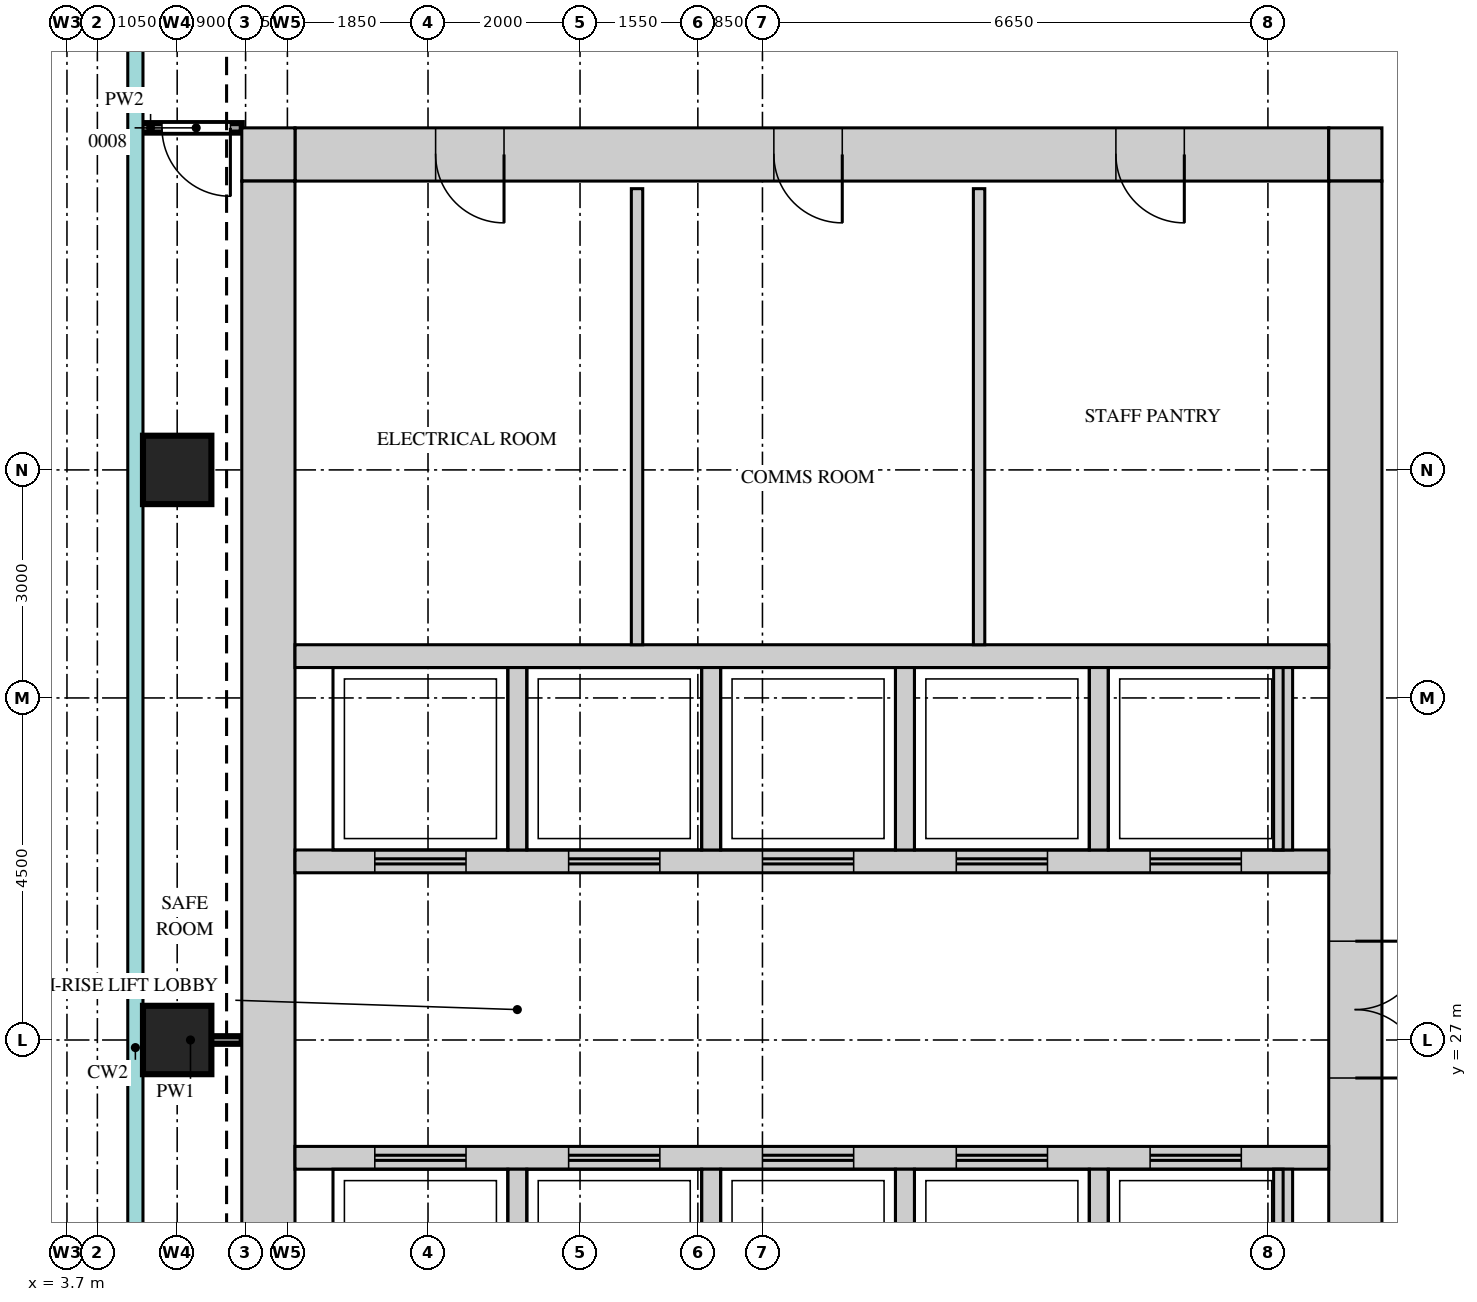
"""IFC4 building model, lengths in metres.
Left out: names, types, materials, properties, quantities, classifications, styles, units other than length and angle.
Written with IfcOpenShell. Run it as: python <this file> out.ifc"""

import sys

from ifc_helpers import new_model, si_unit, direction, frame, frame_2d, origin, origin_2d, place, context, subcontext, project, spatial, rectangle, extrude, source, transform, mapped, element, fill, save


model = new_model("IFC4")
c1 = context("Model", 3, precision=1e-05, world=origin(), true_north=direction((0.0, 1.0)))
c2 = subcontext(c1, "Body", "Model", "MODEL_VIEW")
j1 = project(units=[si_unit("LENGTHUNIT", "METRE"), si_unit("PLANEANGLEUNIT", "RADIAN")], contexts=[c1])
p1 = place(None, origin())
s1 = spatial("IfcSite", under=j1, at=p1, CompositionType="ELEMENT")
p2 = place(p1, origin())
s2 = spatial("IfcBuilding", under=s1, at=p2, CompositionType="ELEMENT")
p3 = place(p2, frame((0.0, 0.0, 242.2)))
s3 = spatial("IfcBuildingStorey", under=s2, at=p3, CompositionType="ELEMENT", Elevation=242.2)
m1 = source(origin(), c2, "Body", "SweptSolid", [
    extrude(rectangle(XDim=13.6, YDim=0.7, at=frame_2d((6.8, 0.0))), origin(), (0.0, 0.0, 1.0), 3.75),
])
p4 = place(p3, frame((6.7, 38.65, 0.0), z_axis=(0.0, 0.0, 1.0), x_axis=(1.0, 0.0, 0.0)))
e1 = element("IfcWall", 1, at=p4, inside=s3, PredefinedType="SHEAR", context=c2, shape_type="MappedRepresentation", body=[
    mapped(m1, transform((0.0, 0.0, 0.0))),
])
m2 = source(origin(), c2, "Body", "SweptSolid", [
    extrude(rectangle(XDim=0.9, YDim=2.1, at=frame_2d((0.45, 1.05))), frame((0.0, 0.36, 0.0), z_axis=(0.0, -1.0, 0.0), x_axis=(1.0, 0.0, 0.0)), (0.0, 0.0, 1.0), 0.72),
])
p5 = place(p4, frame((1.85, 0.0, 0.0)))
e2 = element("IfcOpeningElement", 2, at=p5, cuts=e1, PredefinedType="OPENING", context=c2, shape_type="MappedRepresentation", body=[
    mapped(m2, transform((0.0, 0.0, 0.0))),
])
p6 = place(p4, frame((6.3, 0.0, 0.0)))
e3 = element("IfcOpeningElement", 3, at=p6, cuts=e1, PredefinedType="OPENING", context=c2, shape_type="MappedRepresentation", body=[
    mapped(m2, transform((0.0, 0.0, 0.0))),
])
p7 = place(p4, frame((10.8, 0.0, 0.0)))
e4 = element("IfcOpeningElement", 4, at=p7, cuts=e1, PredefinedType="OPENING", context=c2, shape_type="MappedRepresentation", body=[
    mapped(m2, transform((0.0, 0.0, 0.0))),
])
m3 = source(origin(), c2, "Body", "SweptSolid", [
    extrude(rectangle(XDim=0.7, YDim=0.7, at=frame_2d((0.35, 0.0))), origin(), (0.0, 0.0, 1.0), 3.75),
])
for number, where, z_axis, x_axis in (
    (5, (20.3, 38.65, 0.0), (0.0, 0.0, 1.0), (1.0, 0.0, 0.0)),
    (6, (6.0, 38.65, 0.0), (0.0, 0.0, 1.0), (1.0, 0.0, 0.0)),
):
    element("IfcWall", number, at=place(p3, frame(where, z_axis=z_axis, x_axis=x_axis)), inside=s3, PredefinedType="SHEAR", context=c2, shape_type="MappedRepresentation", body=[
        mapped(m3, transform((0.0, 0.0, 0.0))),
    ])
m4 = source(origin(), c2, "Body", "SweptSolid", [
    extrude(rectangle(XDim=22.6, YDim=0.7, at=frame_2d((11.3, 0.0))), origin(), (0.0, 0.0, 1.0), 3.75),
])
p8 = place(p3, frame((20.65, 15.7, 0.0), z_axis=(0.0, 0.0, 1.0), x_axis=(0.0, 1.0, 0.0)))
e7 = element("IfcWall", 7, at=p8, inside=s3, PredefinedType="SHEAR", context=c2, shape_type="MappedRepresentation", body=[
    mapped(m4, transform((0.0, 0.0, 0.0))),
])
m5 = source(origin(), c2, "Body", "SweptSolid", [
    extrude(rectangle(XDim=1.8, YDim=2.1, at=frame_2d((0.9, 1.05))), frame((0.0, 0.36, 0.0), z_axis=(0.0, -1.0, 0.0), x_axis=(1.0, 0.0, 0.0)), (0.0, 0.0, 1.0), 0.72),
])
p9 = place(p8, frame((10.8, 0.0, 0.0)))
e8 = element("IfcOpeningElement", 8, at=p9, cuts=e7, PredefinedType="OPENING", context=c2, shape_type="MappedRepresentation", body=[
    mapped(m5, transform((0.0, 0.0, 0.0))),
])
p10 = place(p8, frame((0.45, 0.0, 0.0)))
e9 = element("IfcOpeningElement", 9, at=p10, cuts=e7, PredefinedType="OPENING", context=c2, shape_type="MappedRepresentation", body=[
    mapped(m2, transform((0.0, 0.0, 0.0))),
])
m6 = source(origin(), c2, "Body", "SweptSolid", [
    extrude(rectangle(XDim=1.0, YDim=2.1, at=frame_2d((0.5, 1.05))), frame((0.0, 0.36, 0.0), z_axis=(0.0, -1.0, 0.0), x_axis=(1.0, 0.0, 0.0)), (0.0, 0.0, 1.0), 0.72),
])
p11 = place(p8, frame((2.2, 0.0, 0.0)))
e10 = element("IfcOpeningElement", 10, at=p11, cuts=e7, PredefinedType="OPENING", context=c2, shape_type="MappedRepresentation", body=[
    mapped(m6, transform((0.0, 0.0, 0.0))),
])
p12 = place(p8, frame((5.0, 0.0, 0.0)))
e11 = element("IfcOpeningElement", 11, at=p12, cuts=e7, PredefinedType="OPENING", context=c2, shape_type="MappedRepresentation", body=[
    mapped(m2, transform((0.0, 0.0, 0.0))),
])
p13 = place(p3, frame((6.35, 15.7, 0.0), z_axis=(0.0, 0.0, 1.0), x_axis=(0.0, 1.0, 0.0)))
e12 = element("IfcWall", 12, at=p13, inside=s3, PredefinedType="SHEAR", context=c2, shape_type="MappedRepresentation", body=[
    mapped(m4, transform((0.0, 0.0, 0.0))),
])
m7 = source(origin(), c2, "Body", "SweptSolid", [
    extrude(rectangle(XDim=13.6, YDim=0.3, at=frame_2d((6.8, 0.0))), origin(), (0.0, 0.0, 1.0), 3.75),
])
p14 = place(p3, frame((6.7, 32.05, 0.0), z_axis=(0.0, 0.0, 1.0), x_axis=(1.0, 0.0, 0.0)))
e13 = element("IfcWall", 13, at=p14, inside=s3, PredefinedType="STANDARD", context=c2, shape_type="MappedRepresentation", body=[
    mapped(m7, transform((0.0, 0.0, 0.0))),
])
p15 = place(p3, frame((6.7, 29.35, 0.0), z_axis=(0.0, 0.0, 1.0), x_axis=(1.0, 0.0, 0.0)))
e14 = element("IfcWall", 14, at=p15, inside=s3, PredefinedType="STANDARD", context=c2, shape_type="MappedRepresentation", body=[
    mapped(m7, transform((0.0, 0.0, 0.0))),
])
m8 = source(origin(), c2, "Body", "SweptSolid", [
    extrude(rectangle(XDim=1.2, YDim=2.1, at=frame_2d((0.6, 1.05))), frame((0.0, 0.16, 0.0), z_axis=(0.0, -1.0, 0.0), x_axis=(1.0, 0.0, 0.0)), (0.0, 0.0, 1.0), 0.32),
])
p16 = place(p15, frame((1.05, 0.0, 0.0)))
e15 = element("IfcOpeningElement", 15, at=p16, cuts=e14, PredefinedType="OPENING", context=c2, shape_type="MappedRepresentation", body=[
    mapped(m8, transform((0.0, 0.0, 0.0))),
])
p17 = place(p15, frame((3.6, 0.0, 0.0)))
e16 = element("IfcOpeningElement", 16, at=p17, cuts=e14, PredefinedType="OPENING", context=c2, shape_type="MappedRepresentation", body=[
    mapped(m8, transform((0.0, 0.0, 0.0))),
])
p18 = place(p15, frame((6.15, 0.0, 0.0)))
e17 = element("IfcOpeningElement", 17, at=p18, cuts=e14, PredefinedType="OPENING", context=c2, shape_type="MappedRepresentation", body=[
    mapped(m8, transform((0.0, 0.0, 0.0))),
])
p19 = place(p15, frame((8.7, 0.0, 0.0)))
e18 = element("IfcOpeningElement", 18, at=p19, cuts=e14, PredefinedType="OPENING", context=c2, shape_type="MappedRepresentation", body=[
    mapped(m8, transform((0.0, 0.0, 0.0))),
])
p20 = place(p15, frame((11.25, 0.0, 0.0)))
e19 = element("IfcOpeningElement", 19, at=p20, cuts=e14, PredefinedType="OPENING", context=c2, shape_type="MappedRepresentation", body=[
    mapped(m8, transform((0.0, 0.0, 0.0))),
])
p21 = place(p3, frame((6.7, 25.45, 0.0), z_axis=(0.0, 0.0, 1.0), x_axis=(1.0, 0.0, 0.0)))
e20 = element("IfcWall", 20, at=p21, inside=s3, PredefinedType="STANDARD", context=c2, shape_type="MappedRepresentation", body=[
    mapped(m7, transform((0.0, 0.0, 0.0))),
])
p22 = place(p21, frame((1.05, 0.0, 0.0)))
e21 = element("IfcOpeningElement", 21, at=p22, cuts=e20, PredefinedType="OPENING", context=c2, shape_type="MappedRepresentation", body=[
    mapped(m8, transform((0.0, 0.0, 0.0))),
])
p23 = place(p21, frame((3.6, 0.0, 0.0)))
e22 = element("IfcOpeningElement", 22, at=p23, cuts=e20, PredefinedType="OPENING", context=c2, shape_type="MappedRepresentation", body=[
    mapped(m8, transform((0.0, 0.0, 0.0))),
])
p24 = place(p21, frame((6.15, 0.0, 0.0)))
e23 = element("IfcOpeningElement", 23, at=p24, cuts=e20, PredefinedType="OPENING", context=c2, shape_type="MappedRepresentation", body=[
    mapped(m8, transform((0.0, 0.0, 0.0))),
])
p25 = place(p21, frame((8.7, 0.0, 0.0)))
e24 = element("IfcOpeningElement", 24, at=p25, cuts=e20, PredefinedType="OPENING", context=c2, shape_type="MappedRepresentation", body=[
    mapped(m8, transform((0.0, 0.0, 0.0))),
])
p26 = place(p21, frame((11.25, 0.0, 0.0)))
e25 = element("IfcOpeningElement", 25, at=p26, cuts=e20, PredefinedType="OPENING", context=c2, shape_type="MappedRepresentation", body=[
    mapped(m8, transform((0.0, 0.0, 0.0))),
])
m9 = source(origin(), c2, "Body", "SweptSolid", [
    extrude(rectangle(XDim=2.4, YDim=0.25, at=frame_2d((1.2, 0.0))), origin(), (0.0, 0.0, 1.0), 3.75),
])
for number, where, z_axis, x_axis in (
    (26, (17.275, 29.5, 0.0), (0.0, 0.0, 1.0), (0.0, 1.0, 0.0)),
    (27, (19.7, 29.5, 0.0), (0.0, 0.0, 1.0), (0.0, 1.0, 0.0)),
    (28, (9.625, 29.5, 0.0), (0.0, 0.0, 1.0), (0.0, 1.0, 0.0)),
    (29, (12.175, 29.5, 0.0), (0.0, 0.0, 1.0), (0.0, 1.0, 0.0)),
    (30, (14.725, 29.5, 0.0), (0.0, 0.0, 1.0), (0.0, 1.0, 0.0)),
):
    element("IfcWall", number, at=place(p3, frame(where, z_axis=z_axis, x_axis=x_axis)), inside=s3, PredefinedType="STANDARD", context=c2, shape_type="MappedRepresentation", body=[
        mapped(m9, transform((0.0, 0.0, 0.0))),
    ])
m10 = source(origin(), c2, "Body", "SweptSolid", [
    extrude(rectangle(XDim=2.4, YDim=0.25, at=frame_2d((1.2, 0.0))), origin(), (0.0, 0.0, 1.0), 3.75),
])
for number, where, z_axis, x_axis in (
    (31, (17.275, 22.9, 0.0), (0.0, 0.0, 1.0), (0.0, 1.0, 0.0)),
    (32, (19.7, 22.9, 0.0), (0.0, 0.0, 1.0), (0.0, 1.0, 0.0)),
    (33, (9.625, 22.9, 0.0), (0.0, 0.0, 1.0), (0.0, 1.0, 0.0)),
    (34, (12.175, 22.9, 0.0), (0.0, 0.0, 1.0), (0.0, 1.0, 0.0)),
    (35, (14.725, 22.9, 0.0), (0.0, 0.0, 1.0), (0.0, 1.0, 0.0)),
):
    element("IfcWall", number, at=place(p3, frame(where, z_axis=z_axis, x_axis=x_axis)), inside=s3, PredefinedType="STANDARD", context=c2, shape_type="MappedRepresentation", body=[
        mapped(m10, transform((0.0, 0.0, 0.0))),
    ])
m11 = source(origin(), c2, "Body", "SweptSolid", [
    extrude(rectangle(XDim=0.9, YDim=0.9, at=origin_2d()), origin(), (0.0, 0.0, 1.0), 3.75),
])
for number, where, z_axis, x_axis in (
    (36, (5.15, 27.0, 0.0), (0.0, 0.0, 1.0), (1.0, 0.0, 0.0)),
    (37, (5.15, 34.5, 0.0), (0.0, 0.0, 1.0), (1.0, 0.0, 0.0)),
):
    element("IfcColumn", number, at=place(p3, frame(where, z_axis=z_axis, x_axis=x_axis)), inside=s3, PredefinedType="COLUMN", context=c2, shape_type="MappedRepresentation", body=[
        mapped(m11, transform((0.0, 0.0, 0.0))),
    ])
m12 = source(origin(), c2, "Body", "SweptSolid", [
    extrude(rectangle(XDim=1.35, YDim=0.1, at=frame_2d((0.675, 0.0))), origin(), (0.0, 0.0, 1.0), 3.8),
])
p27 = place(p3, frame((4.65, 27.0, 0.0), z_axis=(0.0, 0.0, 1.0), x_axis=(1.0, 0.0, 0.0)))
e38 = element("IfcWall", 38, at=p27, inside=s3, PredefinedType="PARTITIONING", context=c2, shape_type="MappedRepresentation", body=[
    mapped(m12, transform((0.0, 0.0, 0.0))),
])
m13 = source(origin(), c2, "Body", "SweptSolid", [
    extrude(rectangle(XDim=6.0, YDim=0.15, at=frame_2d((3.0, 0.0))), origin(), (0.0, 0.0, 1.0), 3.8),
])
for number, where, z_axis, x_axis in (
    (39, (11.2, 32.2, 0.0), (0.0, 0.0, 1.0), (0.0, 1.0, 0.0)),
    (40, (15.7, 32.2, 0.0), (0.0, 0.0, 1.0), (0.0, 1.0, 0.0)),
):
    element("IfcWall", number, at=place(p3, frame(where, z_axis=z_axis, x_axis=x_axis)), inside=s3, PredefinedType="PARTITIONING", context=c2, shape_type="MappedRepresentation", body=[
        mapped(m13, transform((0.0, 0.0, 0.0))),
    ])
m14 = source(origin(), c2, "Body", "SweptSolid", [
    extrude(rectangle(XDim=1.35, YDim=0.125, at=frame_2d((0.675, 0.0))), origin(), (0.0, 0.0, 1.0), 3.8),
])
p28 = place(p3, frame((4.65, 39.0, 0.0), z_axis=(0.0, 0.0, 1.0), x_axis=(1.0, 0.0, 0.0)))
e41 = element("IfcWall", 41, at=p28, inside=s3, PredefinedType="PARTITIONING", context=c2, shape_type="MappedRepresentation", body=[
    mapped(m14, transform((0.0, 0.0, 0.0))),
])
m15 = source(origin(), c2, "Body", "SweptSolid", [
    extrude(rectangle(XDim=0.9, YDim=2.1, at=frame_2d((0.45, 1.05))), frame((0.0, 0.073, 0.0), z_axis=(0.0, -1.0, 0.0), x_axis=(1.0, 0.0, 0.0)), (0.0, 0.0, 1.0), 0.145),
])
p29 = place(p28, frame((0.3, 0.0, 0.0)))
e42 = element("IfcOpeningElement", 42, at=p29, cuts=e41, PredefinedType="OPENING", context=c2, shape_type="MappedRepresentation", body=[
    mapped(m15, transform((0.0, 0.0, 0.0))),
])
m16 = source(origin(), c2, "Body", "SweptSolid", [
    extrude(rectangle(XDim=1.8, YDim=2.1, at=frame_2d((0.9, 1.05))), frame((0.0, 0.3, 0.0), z_axis=(0.0, -1.0, 0.0), x_axis=(1.0, 0.0, 0.0)), (0.0, 0.0, 1.0), 0.6),
])
p30 = place(p9, origin())
e43 = element("IfcDoor", 43, at=p30, inside=s3, OperationType="DOUBLE_DOOR_SINGLE_SWING", PredefinedType="DOOR", context=c2, shape_type="MappedRepresentation", body=[
    mapped(m16, transform((0.0, 0.0, 0.0))),
])
fill(e8, e43)
m17 = source(origin(), c2, "Body", "SweptSolid", [
    extrude(rectangle(XDim=0.9, YDim=2.1, at=frame_2d((0.45, 1.05))), frame((0.0, 0.3, 0.0), z_axis=(0.0, -1.0, 0.0), x_axis=(1.0, 0.0, 0.0)), (0.0, 0.0, 1.0), 0.6),
])
p31 = place(p5, origin())
e44 = element("IfcDoor", 44, at=p31, inside=s3, OperationType="SINGLE_SWING_RIGHT", PredefinedType="DOOR", context=c2, shape_type="MappedRepresentation", body=[
    mapped(m17, transform((0.0, 0.0, 0.0))),
])
fill(e2, e44)
p32 = place(p6, origin())
e45 = element("IfcDoor", 45, at=p32, inside=s3, OperationType="SINGLE_SWING_RIGHT", PredefinedType="DOOR", context=c2, shape_type="MappedRepresentation", body=[
    mapped(m17, transform((0.0, 0.0, 0.0))),
])
fill(e3, e45)
p33 = place(p7, origin())
e46 = element("IfcDoor", 46, at=p33, inside=s3, OperationType="SINGLE_SWING_RIGHT", PredefinedType="DOOR", context=c2, shape_type="MappedRepresentation", body=[
    mapped(m17, transform((0.0, 0.0, 0.0))),
])
fill(e4, e46)
m18 = source(origin(), c2, "Body", "SweptSolid", [
    extrude(rectangle(XDim=0.9, YDim=2.1, at=frame_2d((0.45, 1.05))), frame((0.0, 0.025, 0.0), z_axis=(0.0, -1.0, 0.0), x_axis=(1.0, 0.0, 0.0)), (0.0, 0.0, 1.0), 0.05),
])
p34 = place(p29, origin())
e47 = element("IfcDoor", 47, at=p34, inside=s3, OperationType="SINGLE_SWING_RIGHT", PredefinedType="DOOR", context=c2, shape_type="MappedRepresentation", body=[
    mapped(m18, transform((0.0, 0.0, 0.0))),
])
fill(e42, e47)
m19 = source(origin(), c2, "Body", "SweptSolid", [
    extrude(rectangle(XDim=1.2, YDim=2.1, at=frame_2d((0.6, 1.05))), frame((0.0, 0.025, 0.0), z_axis=(0.0, -1.0, 0.0), x_axis=(1.0, 0.0, 0.0)), (0.0, 0.0, 1.0), 0.05),
])
p35 = place(p22, origin())
e48 = element("IfcDoor", 48, at=p35, inside=s3, OperationType="DOUBLE_DOOR_SLIDING", PredefinedType="DOOR", context=c2, shape_type="MappedRepresentation", body=[
    mapped(m19, transform((0.0, 0.0, 0.0))),
])
fill(e21, e48)
p36 = place(p23, origin())
e49 = element("IfcDoor", 49, at=p36, inside=s3, OperationType="DOUBLE_DOOR_SLIDING", PredefinedType="DOOR", context=c2, shape_type="MappedRepresentation", body=[
    mapped(m19, transform((0.0, 0.0, 0.0))),
])
fill(e22, e49)
p37 = place(p24, origin())
e50 = element("IfcDoor", 50, at=p37, inside=s3, OperationType="DOUBLE_DOOR_SLIDING", PredefinedType="DOOR", context=c2, shape_type="MappedRepresentation", body=[
    mapped(m19, transform((0.0, 0.0, 0.0))),
])
fill(e23, e50)
p38 = place(p25, origin())
e51 = element("IfcDoor", 51, at=p38, inside=s3, OperationType="DOUBLE_DOOR_SLIDING", PredefinedType="DOOR", context=c2, shape_type="MappedRepresentation", body=[
    mapped(m19, transform((0.0, 0.0, 0.0))),
])
fill(e24, e51)
p39 = place(p26, origin())
e52 = element("IfcDoor", 52, at=p39, inside=s3, OperationType="DOUBLE_DOOR_SLIDING", PredefinedType="DOOR", context=c2, shape_type="MappedRepresentation", body=[
    mapped(m19, transform((0.0, 0.0, 0.0))),
])
fill(e25, e52)
p40 = place(p16, origin())
e53 = element("IfcDoor", 53, at=p40, inside=s3, OperationType="DOUBLE_DOOR_SLIDING", PredefinedType="DOOR", context=c2, shape_type="MappedRepresentation", body=[
    mapped(m19, transform((0.0, 0.0, 0.0))),
])
fill(e15, e53)
p41 = place(p17, origin())
e54 = element("IfcDoor", 54, at=p41, inside=s3, OperationType="DOUBLE_DOOR_SLIDING", PredefinedType="DOOR", context=c2, shape_type="MappedRepresentation", body=[
    mapped(m19, transform((0.0, 0.0, 0.0))),
])
fill(e16, e54)
p42 = place(p18, origin())
e55 = element("IfcDoor", 55, at=p42, inside=s3, OperationType="DOUBLE_DOOR_SLIDING", PredefinedType="DOOR", context=c2, shape_type="MappedRepresentation", body=[
    mapped(m19, transform((0.0, 0.0, 0.0))),
])
fill(e17, e55)
p43 = place(p19, origin())
e56 = element("IfcDoor", 56, at=p43, inside=s3, OperationType="DOUBLE_DOOR_SLIDING", PredefinedType="DOOR", context=c2, shape_type="MappedRepresentation", body=[
    mapped(m19, transform((0.0, 0.0, 0.0))),
])
fill(e18, e56)
p44 = place(p20, origin())
e57 = element("IfcDoor", 57, at=p44, inside=s3, OperationType="DOUBLE_DOOR_SLIDING", PredefinedType="DOOR", context=c2, shape_type="MappedRepresentation", body=[
    mapped(m19, transform((0.0, 0.0, 0.0))),
])
fill(e19, e57)
save(model, sys.argv[1])
